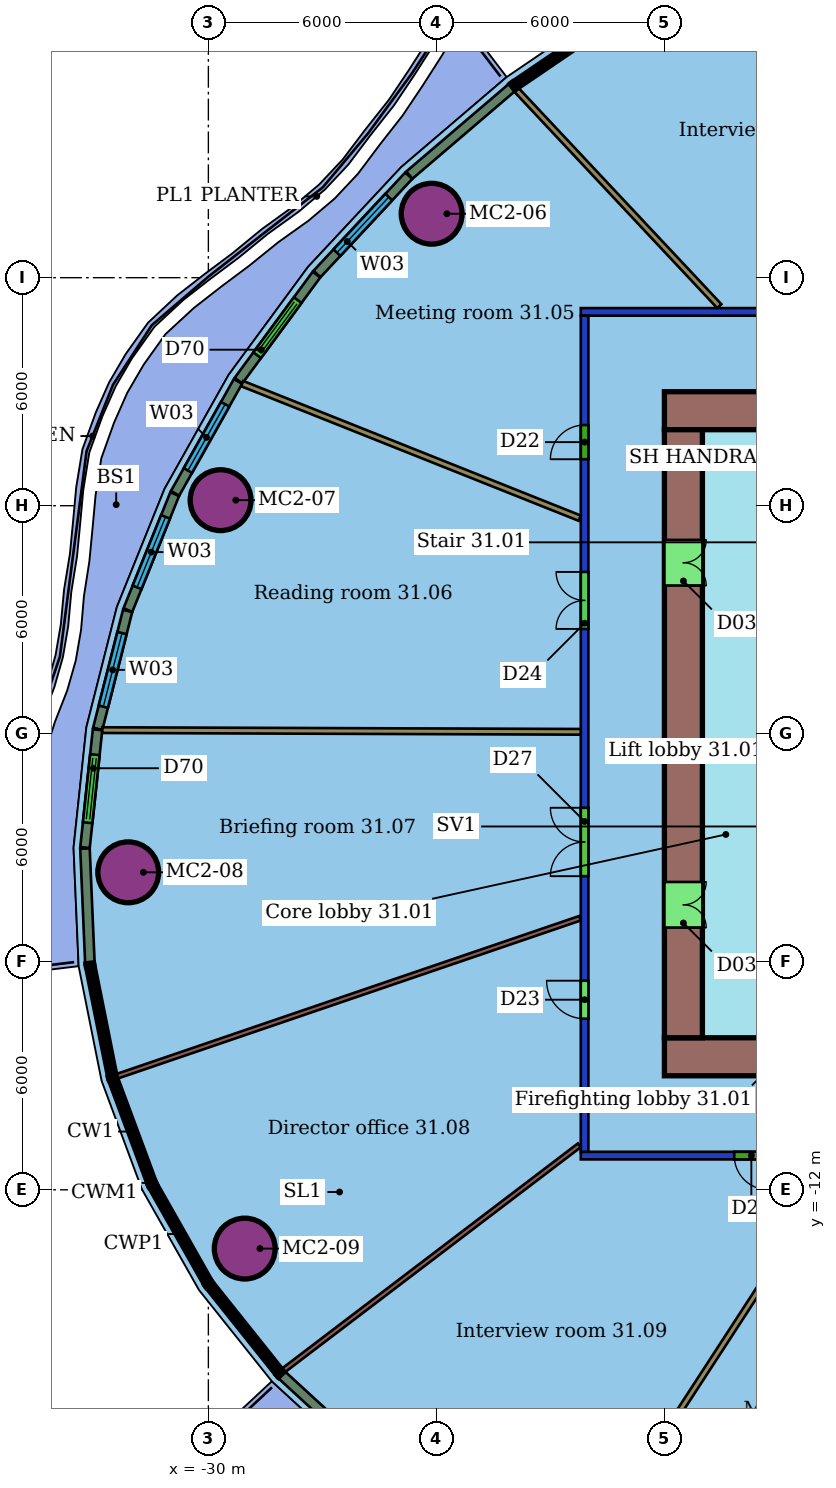
"""IFC4 building model, lengths in metres.
Left out: names, types, materials, properties, quantities, classifications, styles, units other than length and angle.
Written with IfcOpenShell. Run it as: python <this file> out.ifc"""

import sys

from ifc_helpers import new_model, si_unit, direction, frame, frame_2d, origin, origin_2d, place, context, subcontext, project, spatial, rectangle, hollow_circle, extrude, element, fill, save


model = new_model("IFC4")
c1 = context("Model", 3, precision=1e-05, world=origin(), true_north=direction((0.0, 1.0)))
c2 = subcontext(c1, "Body", "Model", "MODEL_VIEW")
j1 = project(units=[si_unit("LENGTHUNIT", "METRE"), si_unit("PLANEANGLEUNIT", "RADIAN")], contexts=[c1])
p1 = place(None, origin())
s1 = spatial("IfcSite", under=j1, at=p1, CompositionType="ELEMENT")
p2 = place(p1, origin())
s2 = spatial("IfcBuilding", under=s1, at=p2, CompositionType="ELEMENT")
p3 = place(p2, frame((0.0, 0.0, 131.8)))
s3 = spatial("IfcBuildingStorey", under=s2, at=p3, CompositionType="ELEMENT", Elevation=131.8)
for number, where, z_axis, x_axis in (
    (1, (-24.125, 13.683, 0.0), (0.0, 0.0, 1.0), (1.0, 0.0, 0.0)),
    (2, (-29.679, 6.146, 0.0), (0.0, 0.0, 1.0), (1.0, 0.0, 0.0)),
    (3, (-32.109, -3.646, 0.0), (0.0, 0.0, 1.0), (1.0, 0.0, 0.0)),
    (4, (-29.043, -13.547, 0.0), (0.0, 0.0, 1.0), (1.0, 0.0, 0.0)),
):
    element("IfcColumn", number, at=place(p3, frame(where, z_axis=z_axis, x_axis=x_axis)), inside=s3, PredefinedType="COLUMN", context=c2, shape_type="SweptSolid", body=[
        extrude(hollow_circle(Radius=0.8, WallThickness=0.055, at=origin_2d()), origin(), (0.0, 0.0, 1.0), 3.4),
    ])
p4 = place(p3, frame((8.2, -11.1, 0.0), z_axis=(0.0, 0.0, 1.0), x_axis=(-1.0, 0.0, 0.0)))
e5 = element("IfcWall", 5, at=p4, inside=s3, PredefinedType="PARTITIONING", context=c2, shape_type="SweptSolid", body=[
    extrude(rectangle(XDim=28.4, YDim=0.2, at=frame_2d((14.2, 0.0))), origin(), (0.0, 0.0, 1.0), 2.95),
])
p5 = place(p4, frame((23.462, 0.0, 0.0)))
e6 = element("IfcOpeningElement", 6, at=p5, cuts=e5, PredefinedType="OPENING", context=c2, shape_type="SweptSolid", body=[
    extrude(rectangle(XDim=0.9, YDim=2.1, at=frame_2d((0.45, 1.05))), frame((0.0, 0.11, 0.0), z_axis=(0.0, -1.0, 0.0), x_axis=(1.0, 0.0, 0.0)), (0.0, 0.0, 1.0), 0.22),
])
p6 = place(p4, frame((19.118, 0.0, 0.0)))
e7 = element("IfcOpeningElement", 7, at=p6, cuts=e5, PredefinedType="OPENING", context=c2, shape_type="SweptSolid", body=[
    extrude(rectangle(XDim=0.9, YDim=2.1, at=frame_2d((0.45, 1.05))), frame((0.0, 0.11, 0.0), z_axis=(0.0, -1.0, 0.0), x_axis=(1.0, 0.0, 0.0)), (0.0, 0.0, 1.0), 0.22),
])
p7 = place(p4, frame((12.5, 0.0, 0.0)))
e8 = element("IfcOpeningElement", 8, at=p7, cuts=e5, PredefinedType="OPENING", context=c2, shape_type="SweptSolid", body=[
    extrude(rectangle(XDim=0.9, YDim=2.1, at=frame_2d((0.45, 1.05))), frame((0.0, 0.11, 0.0), z_axis=(0.0, -1.0, 0.0), x_axis=(1.0, 0.0, 0.0)), (0.0, 0.0, 1.0), 0.22),
])
p8 = place(p4, frame((8.033, 0.0, 0.0)))
e9 = element("IfcOpeningElement", 9, at=p8, cuts=e5, PredefinedType="OPENING", context=c2, shape_type="SweptSolid", body=[
    extrude(rectangle(XDim=0.9, YDim=2.1, at=frame_2d((0.45, 1.05))), frame((0.0, 0.11, 0.0), z_axis=(0.0, -1.0, 0.0), x_axis=(1.0, 0.0, 0.0)), (0.0, 0.0, 1.0), 0.22),
])
p9 = place(p3, frame((-20.1, -11.0, 0.0), z_axis=(0.0, 0.0, 1.0), x_axis=(0.0, 1.0, 0.0)))
e10 = element("IfcWall", 10, at=p9, inside=s3, PredefinedType="PARTITIONING", context=c2, shape_type="SweptSolid", body=[
    extrude(rectangle(XDim=22.0, YDim=0.2, at=frame_2d((11.0, 0.0))), origin(), (0.0, 0.0, 1.0), 2.95),
])
p10 = place(p9, frame((18.223, 0.0, 0.0)))
e11 = element("IfcOpeningElement", 11, at=p10, cuts=e10, PredefinedType="OPENING", context=c2, shape_type="SweptSolid", body=[
    extrude(rectangle(XDim=0.9, YDim=2.1, at=frame_2d((0.45, 1.05))), frame((0.0, 0.11, 0.0), z_axis=(0.0, -1.0, 0.0), x_axis=(1.0, 0.0, 0.0)), (0.0, 0.0, 1.0), 0.22),
])
p11 = place(p9, frame((13.758, 0.0, 0.0)))
e12 = element("IfcOpeningElement", 12, at=p11, cuts=e10, PredefinedType="OPENING", context=c2, shape_type="SweptSolid", body=[
    extrude(rectangle(XDim=1.5, YDim=2.1, at=frame_2d((0.75, 1.05))), frame((0.0, 0.11, 0.0), z_axis=(0.0, -1.0, 0.0), x_axis=(1.0, 0.0, 0.0)), (0.0, 0.0, 1.0), 0.22),
])
p12 = place(p9, frame((7.252, 0.0, 0.0)))
e13 = element("IfcOpeningElement", 13, at=p12, cuts=e10, PredefinedType="OPENING", context=c2, shape_type="SweptSolid", body=[
    extrude(rectangle(XDim=1.8, YDim=2.4, at=frame_2d((0.9, 1.2))), frame((0.0, 0.11, 0.0), z_axis=(0.0, -1.0, 0.0), x_axis=(1.0, 0.0, 0.0)), (0.0, 0.0, 1.0), 0.22),
])
p13 = place(p9, frame((3.502, 0.0, 0.0)))
e14 = element("IfcOpeningElement", 14, at=p13, cuts=e10, PredefinedType="OPENING", context=c2, shape_type="SweptSolid", body=[
    extrude(rectangle(XDim=1.0, YDim=2.4, at=frame_2d((0.5, 1.2))), frame((0.0, 0.11, 0.0), z_axis=(0.0, -1.0, 0.0), x_axis=(1.0, 0.0, 0.0)), (0.0, 0.0, 1.0), 0.22),
])
p14 = place(p3, frame((-20.2, 11.1, 0.0), z_axis=(0.0, 0.0, 1.0), x_axis=(1.0, 0.0, 0.0)))
e15 = element("IfcWall", 15, at=p14, inside=s3, PredefinedType="PARTITIONING", context=c2, shape_type="SweptSolid", body=[
    extrude(rectangle(XDim=28.4, YDim=0.2, at=frame_2d((14.2, 0.0))), origin(), (0.0, 0.0, 1.0), 2.95),
])
p15 = place(p14, frame((23.187, 0.0, 0.0)))
e16 = element("IfcOpeningElement", 16, at=p15, cuts=e15, PredefinedType="OPENING", context=c2, shape_type="SweptSolid", body=[
    extrude(rectangle(XDim=1.8, YDim=2.4, at=frame_2d((0.9, 1.2))), frame((0.0, 0.11, 0.0), z_axis=(0.0, -1.0, 0.0), x_axis=(1.0, 0.0, 0.0)), (0.0, 0.0, 1.0), 0.22),
])
p16 = place(p14, frame((19.052, 0.0, 0.0)))
e17 = element("IfcOpeningElement", 17, at=p16, cuts=e15, PredefinedType="OPENING", context=c2, shape_type="SweptSolid", body=[
    extrude(rectangle(XDim=1.0, YDim=2.4, at=frame_2d((0.5, 1.2))), frame((0.0, 0.11, 0.0), z_axis=(0.0, -1.0, 0.0), x_axis=(1.0, 0.0, 0.0)), (0.0, 0.0, 1.0), 0.22),
])
p17 = place(p14, frame((12.32, 0.0, 0.0)))
e18 = element("IfcOpeningElement", 18, at=p17, cuts=e15, PredefinedType="OPENING", context=c2, shape_type="SweptSolid", body=[
    extrude(rectangle(XDim=1.5, YDim=2.1, at=frame_2d((0.75, 1.05))), frame((0.0, 0.11, 0.0), z_axis=(0.0, -1.0, 0.0), x_axis=(1.0, 0.0, 0.0)), (0.0, 0.0, 1.0), 0.22),
])
p18 = place(p14, frame((8.033, 0.0, 0.0)))
e19 = element("IfcOpeningElement", 19, at=p18, cuts=e15, PredefinedType="OPENING", context=c2, shape_type="SweptSolid", body=[
    extrude(rectangle(XDim=0.9, YDim=2.1, at=frame_2d((0.45, 1.05))), frame((0.0, 0.11, 0.0), z_axis=(0.0, -1.0, 0.0), x_axis=(1.0, 0.0, 0.0)), (0.0, 0.0, 1.0), 0.22),
])
p19 = place(p3, frame((-21.893, 16.941, 0.0), z_axis=(0.0, 0.0, 1.0), x_axis=(0.684185696534, -0.729307844917, 0.0)))
e20 = element("IfcWall", 20, at=p19, inside=s3, PredefinedType="PARTITIONING", context=c2, shape_type="SweptSolid", body=[
    extrude(rectangle(XDim=7.802, YDim=0.15, at=frame_2d((3.901, 0.0))), origin(), (0.0, 0.0, 1.0), 3.4),
])
p20 = place(p3, frame((-29.11, 9.213, 0.0), z_axis=(0.0, 0.0, 1.0), x_axis=(0.928905711754, -0.370316322447, 0.0)))
e21 = element("IfcWall", 21, at=p20, inside=s3, PredefinedType="PARTITIONING", context=c2, shape_type="SweptSolid", body=[
    extrude(rectangle(XDim=9.562, YDim=0.15, at=frame_2d((4.781, 0.0))), origin(), (0.0, 0.0, 1.0), 3.4),
])
p21 = place(p3, frame((-32.792, 0.095, 0.0), z_axis=(0.0, 0.0, 1.0), x_axis=(0.999993705333, -0.003548139601, 0.0)))
e22 = element("IfcWall", 22, at=p21, inside=s3, PredefinedType="PARTITIONING", context=c2, shape_type="SweptSolid", body=[
    extrude(rectangle(XDim=12.592, YDim=0.15, at=frame_2d((6.296, 0.0))), origin(), (0.0, 0.0, 1.0), 3.4),
])
p22 = place(p3, frame((-32.402, -9.013, 0.0), z_axis=(0.0, 0.0, 1.0), x_axis=(0.946378852939, 0.32305892142, 0.0)))
e23 = element("IfcWall", 23, at=p22, inside=s3, PredefinedType="PARTITIONING", context=c2, shape_type="SweptSolid", body=[
    extrude(rectangle(XDim=12.872, YDim=0.125, at=frame_2d((6.436, 0.0))), origin(), (0.0, 0.0, 1.0), 3.4),
])
p23 = place(p3, frame((-28.02, -16.748, 0.0), z_axis=(0.0, 0.0, 1.0), x_axis=(0.795936459637, 0.605380171644, 0.0)))
e24 = element("IfcWall", 24, at=p23, inside=s3, PredefinedType="PARTITIONING", context=c2, shape_type="SweptSolid", body=[
    extrude(rectangle(XDim=9.777, YDim=0.125, at=frame_2d((4.888, 0.0))), origin(), (0.0, 0.0, 1.0), 3.4),
])
p24 = place(p3, frame((-20.291, -21.959, 0.0), z_axis=(0.0, 0.0, 1.0), x_axis=(0.545467381377, 0.838132051561, 0.0)))
e25 = element("IfcWall", 25, at=p24, inside=s3, PredefinedType="PARTITIONING", context=c2, shape_type="SweptSolid", body=[
    extrude(rectangle(XDim=12.788, YDim=0.15, at=frame_2d((6.394, 0.0))), origin(), (0.0, 0.0, 1.0), 3.4),
])
p25 = place(p3, frame((-22.011, 17.005, 0.0), z_axis=(0.0, 0.0, 1.0), x_axis=(-0.760361656754, -0.649499923739, 0.0)))
e26 = element("IfcWall", 26, at=p25, inside=s3, PredefinedType="SOLIDWALL", context=c2, shape_type="SweptSolid", body=[
    extrude(rectangle(XDim=3.552, YDim=0.25, at=frame_2d((1.776, 0.0))), origin(), (0.0, 0.0, 1.0), 3.0),
])
p26 = place(p3, frame((-24.728, 14.683, 0.0), z_axis=(0.0, 0.0, 1.0), x_axis=(-0.68242890863, -0.730951971518, 0.0)))
e27 = element("IfcWall", 27, at=p26, inside=s3, PredefinedType="SOLIDWALL", context=c2, shape_type="SweptSolid", body=[
    extrude(rectangle(XDim=3.537, YDim=0.25, at=frame_2d((1.769, 0.0))), origin(), (0.0, 0.0, 1.0), 3.0),
])
p27 = place(p26, frame((0.769, 0.0, 0.9)))
e28 = element("IfcOpeningElement", 28, at=p27, cuts=e27, PredefinedType="OPENING", context=c2, shape_type="SweptSolid", body=[
    extrude(rectangle(XDim=2.0, YDim=2.1, at=frame_2d((1.0, 1.05))), frame((0.0, 0.135, 0.0), z_axis=(0.0, -1.0, 0.0), x_axis=(1.0, 0.0, 0.0)), (0.0, 0.0, 1.0), 0.27),
])
p28 = place(p3, frame((-27.156, 12.08, 0.0), z_axis=(0.0, 0.0, 1.0), x_axis=(-0.592551943195, -0.805532243064, 0.0)))
e29 = element("IfcWall", 29, at=p28, inside=s3, PredefinedType="SOLIDWALL", context=c2, shape_type="SweptSolid", body=[
    extrude(rectangle(XDim=3.463, YDim=0.25, at=frame_2d((1.731, 0.0))), origin(), (0.0, 0.0, 1.0), 3.0),
])
p29 = place(p28, frame((0.832, 0.0, 0.0)))
e30 = element("IfcOpeningElement", 30, at=p29, cuts=e29, PredefinedType="OPENING", context=c2, shape_type="SweptSolid", body=[
    extrude(rectangle(XDim=1.8, YDim=2.4, at=frame_2d((0.9, 1.2))), frame((0.0, 0.135, 0.0), z_axis=(0.0, -1.0, 0.0), x_axis=(1.0, 0.0, 0.0)), (0.0, 0.0, 1.0), 0.27),
])
p30 = place(p3, frame((-29.221, 9.271, 0.0), z_axis=(0.0, 0.0, 1.0), x_axis=(-0.489962712025, -0.871743391616, 0.0)))
e31 = element("IfcWall", 31, at=p30, inside=s3, PredefinedType="SOLIDWALL", context=c2, shape_type="SweptSolid", body=[
    extrude(rectangle(XDim=3.378, YDim=0.25, at=frame_2d((1.689, 0.0))), origin(), (0.0, 0.0, 1.0), 3.0),
])
p31 = place(p30, frame((0.689, 0.0, 0.9)))
e32 = element("IfcOpeningElement", 32, at=p31, cuts=e31, PredefinedType="OPENING", context=c2, shape_type="SweptSolid", body=[
    extrude(rectangle(XDim=2.0, YDim=2.1, at=frame_2d((1.0, 1.05))), frame((0.0, 0.135, 0.0), z_axis=(0.0, -1.0, 0.0), x_axis=(1.0, 0.0, 0.0)), (0.0, 0.0, 1.0), 0.27),
])
p32 = place(p3, frame((-30.886, 6.304, 0.0), z_axis=(0.0, 0.0, 1.0), x_axis=(-0.374307156661, -0.927304778631, 0.0)))
e33 = element("IfcWall", 33, at=p32, inside=s3, PredefinedType="SOLIDWALL", context=c2, shape_type="SweptSolid", body=[
    extrude(rectangle(XDim=3.289, YDim=0.25, at=frame_2d((1.644, 0.0))), origin(), (0.0, 0.0, 1.0), 3.0),
])
p33 = place(p32, frame((0.644, 0.0, 0.9)))
e34 = element("IfcOpeningElement", 34, at=p33, cuts=e33, PredefinedType="OPENING", context=c2, shape_type="SweptSolid", body=[
    extrude(rectangle(XDim=2.0, YDim=2.1, at=frame_2d((1.0, 1.05))), frame((0.0, 0.135, 0.0), z_axis=(0.0, -1.0, 0.0), x_axis=(1.0, 0.0, 0.0)), (0.0, 0.0, 1.0), 0.27),
])
p34 = place(p3, frame((-32.125, 3.231, 0.0), z_axis=(0.0, 0.0, 1.0), x_axis=(-0.245873914642, -0.969301819919, 0.0)))
e35 = element("IfcWall", 35, at=p34, inside=s3, PredefinedType="SOLIDWALL", context=c2, shape_type="SweptSolid", body=[
    extrude(rectangle(XDim=3.199, YDim=0.25, at=frame_2d((1.6, 0.0))), origin(), (0.0, 0.0, 1.0), 3.0),
])
p35 = place(p34, frame((0.6, 0.0, 0.9)))
e36 = element("IfcOpeningElement", 36, at=p35, cuts=e35, PredefinedType="OPENING", context=c2, shape_type="SweptSolid", body=[
    extrude(rectangle(XDim=2.0, YDim=2.1, at=frame_2d((1.0, 1.05))), frame((0.0, 0.135, 0.0), z_axis=(0.0, -1.0, 0.0), x_axis=(1.0, 0.0, 0.0)), (0.0, 0.0, 1.0), 0.27),
])
p36 = place(p3, frame((-32.916, 0.104, 0.0), z_axis=(0.0, 0.0, 1.0), x_axis=(-0.105985463216, -0.994367679275, 0.0)))
e37 = element("IfcWall", 37, at=p36, inside=s3, PredefinedType="SOLIDWALL", context=c2, shape_type="SweptSolid", body=[
    extrude(rectangle(XDim=3.117, YDim=0.25, at=frame_2d((1.558, 0.0))), origin(), (0.0, 0.0, 1.0), 3.0),
])
p37 = place(p36, frame((0.658, 0.0, 0.0)))
e38 = element("IfcOpeningElement", 38, at=p37, cuts=e37, PredefinedType="OPENING", context=c2, shape_type="SweptSolid", body=[
    extrude(rectangle(XDim=1.8, YDim=2.4, at=frame_2d((0.9, 1.2))), frame((0.0, 0.135, 0.0), z_axis=(0.0, -1.0, 0.0), x_axis=(1.0, 0.0, 0.0)), (0.0, 0.0, 1.0), 0.27),
])
for number, where, z_axis, x_axis in (
    (39, (-33.247, -3.021, 0.0), (0.0, 0.0, 1.0), (0.043, -0.999, 0.0)),
    (40, (-28.07, -16.87, 0.0), (0.0, 0.0, 1.0), (0.737, -0.676, 0.0)),
):
    element("IfcWall", number, at=place(p3, frame(where, z_axis=z_axis, x_axis=x_axis)), inside=s3, PredefinedType="SOLIDWALL", context=c2, shape_type="SweptSolid", body=[
        extrude(rectangle(XDim=3.006, YDim=0.25, at=frame_2d((1.503, 0.0))), origin(), (0.0, 0.0, 1.0), 3.0),
    ])
p38 = place(p3, frame((-6.0, 8.5, 0.0), z_axis=(0.0, 0.0, 1.0), x_axis=(-1.0, 0.0, 0.0)))
e41 = element("IfcWall", 41, at=p38, inside=s3, PredefinedType="SHEAR", context=c2, shape_type="SweptSolid", body=[
    extrude(rectangle(XDim=12.0, YDim=1.0, at=frame_2d((6.0, 0.0))), origin(), (0.0, 0.0, 1.0), 3.3),
])
p39 = place(p38, frame((5.2, 0.0, 0.0)))
e42 = element("IfcOpeningElement", 42, at=p39, cuts=e41, PredefinedType="OPENING", context=c2, shape_type="SweptSolid", body=[
    extrude(rectangle(XDim=1.2, YDim=2.1, at=frame_2d((0.6, 1.05))), frame((0.0, 0.51, 0.0), z_axis=(0.0, -1.0, 0.0), x_axis=(1.0, 0.0, 0.0)), (0.0, 0.0, 1.0), 1.02),
])
p40 = place(p3, frame((-18.0, -8.5, 0.0), z_axis=(0.0, 0.0, 1.0), x_axis=(1.0, 0.0, 0.0)))
e43 = element("IfcWall", 43, at=p40, inside=s3, PredefinedType="SHEAR", context=c2, shape_type="SweptSolid", body=[
    extrude(rectangle(XDim=24.0, YDim=1.0, at=frame_2d((12.0, 0.0))), origin(), (0.0, 0.0, 1.0), 3.3),
])
p41 = place(p40, frame((6.0, 0.0, 0.0)))
e44 = element("IfcOpeningElement", 44, at=p41, cuts=e43, PredefinedType="OPENING", context=c2, shape_type="SweptSolid", body=[
    extrude(rectangle(XDim=1.2, YDim=2.1, at=frame_2d((0.6, 1.05))), frame((0.0, 0.51, 0.0), z_axis=(0.0, -1.0, 0.0), x_axis=(1.0, 0.0, 0.0)), (0.0, 0.0, 1.0), 1.02),
])
p42 = place(p3, frame((-17.5, 8.0, 0.0), z_axis=(0.0, 0.0, 1.0), x_axis=(0.0, -1.0, 0.0)))
e45 = element("IfcWall", 45, at=p42, inside=s3, PredefinedType="SHEAR", context=c2, shape_type="SweptSolid", body=[
    extrude(rectangle(XDim=16.0, YDim=1.0, at=frame_2d((8.0, 0.0))), origin(), (0.0, 0.0, 1.0), 3.3),
])
p43 = place(p42, frame((11.9, 0.0, 0.0)))
e46 = element("IfcOpeningElement", 46, at=p43, cuts=e45, PredefinedType="OPENING", context=c2, shape_type="SweptSolid", body=[
    extrude(rectangle(XDim=1.2, YDim=2.1, at=frame_2d((0.6, 1.05))), frame((0.0, 0.51, 0.0), z_axis=(0.0, -1.0, 0.0), x_axis=(1.0, 0.0, 0.0)), (0.0, 0.0, 1.0), 1.02),
])
p44 = place(p42, frame((2.9, 0.0, 0.0)))
e47 = element("IfcOpeningElement", 47, at=p44, cuts=e45, PredefinedType="OPENING", context=c2, shape_type="SweptSolid", body=[
    extrude(rectangle(XDim=1.2, YDim=2.1, at=frame_2d((0.6, 1.05))), frame((0.0, 0.51, 0.0), z_axis=(0.0, -1.0, 0.0), x_axis=(1.0, 0.0, 0.0)), (0.0, 0.0, 1.0), 1.02),
])
p45 = place(p10, origin())
e48 = element("IfcDoor", 48, at=p45, inside=s3, OperationType="SINGLE_SWING_LEFT", PredefinedType="DOOR", context=c2, shape_type="SweptSolid", body=[
    extrude(rectangle(XDim=0.9, YDim=2.1, at=frame_2d((0.45, 1.05))), frame((0.0, 0.025, 0.0), z_axis=(0.0, -1.0, 0.0), x_axis=(1.0, 0.0, 0.0)), (0.0, 0.0, 1.0), 0.05),
])
fill(e11, e48)
p46 = place(p11, origin())
e49 = element("IfcDoor", 49, at=p46, inside=s3, OperationType="DOUBLE_DOOR_SINGLE_SWING", PredefinedType="DOOR", context=c2, shape_type="SweptSolid", body=[
    extrude(rectangle(XDim=1.5, YDim=2.1, at=frame_2d((0.75, 1.05))), frame((0.0, 0.025, 0.0), z_axis=(0.0, -1.0, 0.0), x_axis=(1.0, 0.0, 0.0)), (0.0, 0.0, 1.0), 0.05),
])
fill(e12, e49)
p47 = place(p12, origin())
e50 = element("IfcDoor", 50, at=p47, inside=s3, OperationType="DOUBLE_DOOR_SINGLE_SWING", PredefinedType="DOOR", context=c2, shape_type="SweptSolid", body=[
    extrude(rectangle(XDim=1.8, YDim=2.4, at=frame_2d((0.9, 1.2))), frame((0.0, 0.025, 0.0), z_axis=(0.0, -1.0, 0.0), x_axis=(1.0, 0.0, 0.0)), (0.0, 0.0, 1.0), 0.05),
])
fill(e13, e50)
p48 = place(p13, origin())
e51 = element("IfcDoor", 51, at=p48, inside=s3, OperationType="SINGLE_SWING_RIGHT", PredefinedType="DOOR", context=c2, shape_type="SweptSolid", body=[
    extrude(rectangle(XDim=1.0, YDim=2.4, at=frame_2d((0.5, 1.2))), frame((0.0, 0.025, 0.0), z_axis=(0.0, -1.0, 0.0), x_axis=(1.0, 0.0, 0.0)), (0.0, 0.0, 1.0), 0.05),
])
fill(e14, e51)
p49 = place(p5, origin())
e52 = element("IfcDoor", 52, at=p49, inside=s3, OperationType="SINGLE_SWING_LEFT", PredefinedType="DOOR", context=c2, shape_type="SweptSolid", body=[
    extrude(rectangle(XDim=0.9, YDim=2.1, at=frame_2d((0.45, 1.05))), frame((0.0, 0.025, 0.0), z_axis=(0.0, -1.0, 0.0), x_axis=(1.0, 0.0, 0.0)), (0.0, 0.0, 1.0), 0.05),
])
fill(e6, e52)
p50 = place(p27, origin())
e53 = element("IfcWindow", 53, at=p50, inside=s3, PartitioningType="SINGLE_PANEL", PredefinedType="WINDOW", context=c2, shape_type="SweptSolid", body=[
    extrude(rectangle(XDim=2.0, YDim=2.1, at=frame_2d((1.0, 1.05))), frame((0.0, 0.03, 0.0), z_axis=(0.0, -1.0, 0.0), x_axis=(1.0, 0.0, 0.0)), (0.0, 0.0, 1.0), 0.06),
])
fill(e28, e53)
p51 = place(p29, origin())
e54 = element("IfcDoor", 54, at=p51, inside=s3, OperationType="DOUBLE_DOOR_SLIDING", PredefinedType="DOOR", context=c2, shape_type="SweptSolid", body=[
    extrude(rectangle(XDim=1.8, YDim=2.4, at=frame_2d((0.9, 1.2))), frame((0.0, 0.025, 0.0), z_axis=(0.0, -1.0, 0.0), x_axis=(1.0, 0.0, 0.0)), (0.0, 0.0, 1.0), 0.05),
])
fill(e30, e54)
p52 = place(p31, origin())
e55 = element("IfcWindow", 55, at=p52, inside=s3, PartitioningType="SINGLE_PANEL", PredefinedType="WINDOW", context=c2, shape_type="SweptSolid", body=[
    extrude(rectangle(XDim=2.0, YDim=2.1, at=frame_2d((1.0, 1.05))), frame((0.0, 0.03, 0.0), z_axis=(0.0, -1.0, 0.0), x_axis=(1.0, 0.0, 0.0)), (0.0, 0.0, 1.0), 0.06),
])
fill(e32, e55)
p53 = place(p33, origin())
e56 = element("IfcWindow", 56, at=p53, inside=s3, PartitioningType="SINGLE_PANEL", PredefinedType="WINDOW", context=c2, shape_type="SweptSolid", body=[
    extrude(rectangle(XDim=2.0, YDim=2.1, at=frame_2d((1.0, 1.05))), frame((0.0, 0.03, 0.0), z_axis=(0.0, -1.0, 0.0), x_axis=(1.0, 0.0, 0.0)), (0.0, 0.0, 1.0), 0.06),
])
fill(e34, e56)
p54 = place(p35, origin())
e57 = element("IfcWindow", 57, at=p54, inside=s3, PartitioningType="SINGLE_PANEL", PredefinedType="WINDOW", context=c2, shape_type="SweptSolid", body=[
    extrude(rectangle(XDim=2.0, YDim=2.1, at=frame_2d((1.0, 1.05))), frame((0.0, 0.03, 0.0), z_axis=(0.0, -1.0, 0.0), x_axis=(1.0, 0.0, 0.0)), (0.0, 0.0, 1.0), 0.06),
])
fill(e36, e57)
p55 = place(p37, origin())
e58 = element("IfcDoor", 58, at=p55, inside=s3, OperationType="DOUBLE_DOOR_SLIDING", PredefinedType="DOOR", context=c2, shape_type="SweptSolid", body=[
    extrude(rectangle(XDim=1.8, YDim=2.4, at=frame_2d((0.9, 1.2))), frame((0.0, 0.025, 0.0), z_axis=(0.0, -1.0, 0.0), x_axis=(1.0, 0.0, 0.0)), (0.0, 0.0, 1.0), 0.05),
])
fill(e38, e58)
p56 = place(p43, origin())
e59 = element("IfcDoor", 59, at=p56, inside=s3, OperationType="DOUBLE_DOOR_SINGLE_SWING", PredefinedType="NOTDEFINED", context=c2, shape_type="SweptSolid", body=[
    extrude(rectangle(XDim=1.2, YDim=2.1, at=frame_2d((0.6, 1.05))), frame((0.0, 0.025, 0.0), z_axis=(0.0, -1.0, 0.0), x_axis=(1.0, 0.0, 0.0)), (0.0, 0.0, 1.0), 0.05),
])
fill(e46, e59)
p57 = place(p44, origin())
e60 = element("IfcDoor", 60, at=p57, inside=s3, OperationType="DOUBLE_DOOR_SINGLE_SWING", PredefinedType="NOTDEFINED", context=c2, shape_type="SweptSolid", body=[
    extrude(rectangle(XDim=1.2, YDim=2.1, at=frame_2d((0.6, 1.05))), frame((0.0, 0.025, 0.0), z_axis=(0.0, -1.0, 0.0), x_axis=(1.0, 0.0, 0.0)), (0.0, 0.0, 1.0), 0.05),
])
fill(e47, e60)
save(model, sys.argv[1])
